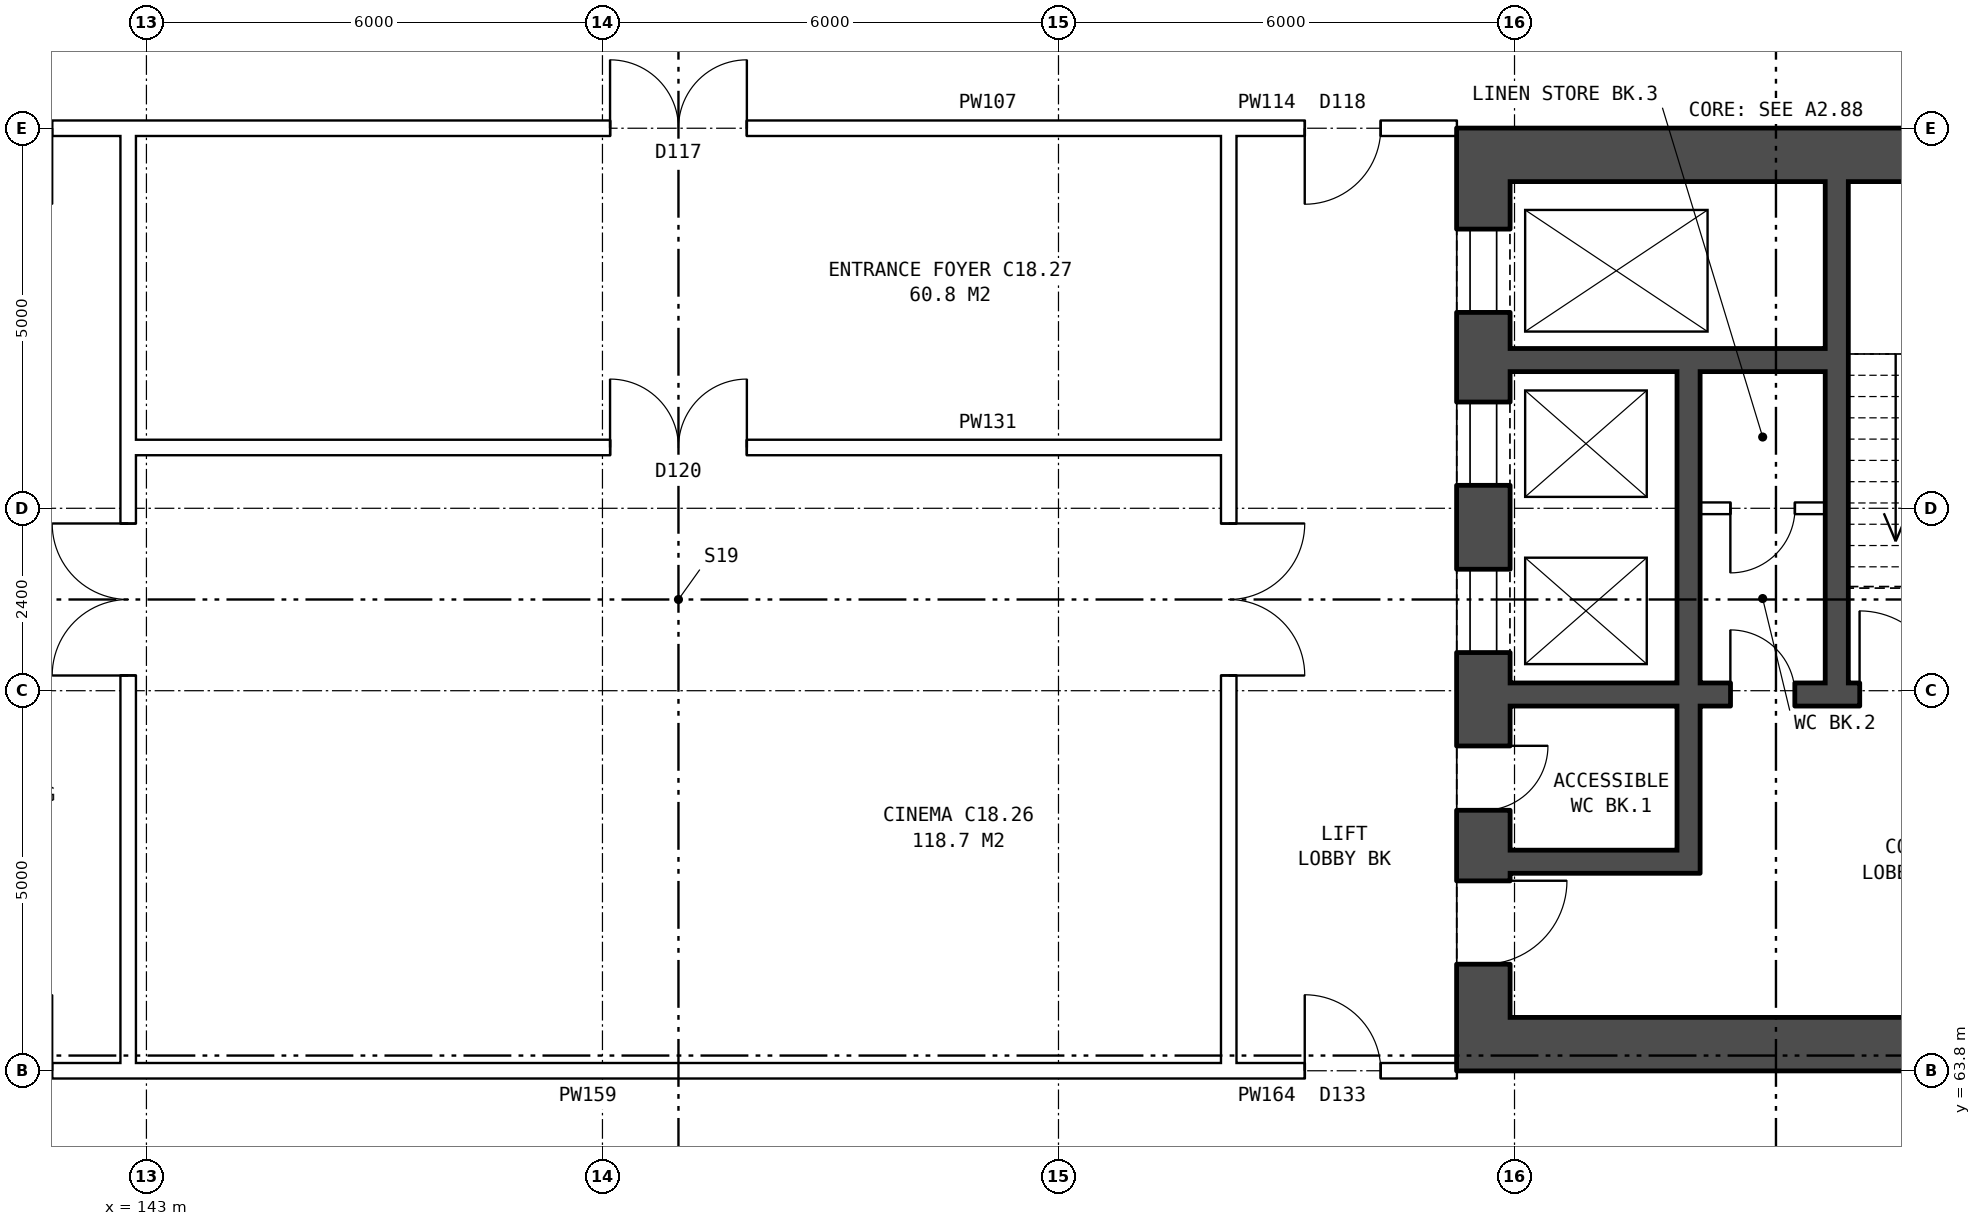
"""IFC4 building model, lengths in metres.
Left out: names, types, materials, properties, quantities, classifications, styles, units other than length and angle.
Written with IfcOpenShell. Run it as: python <this file> out.ifc"""

import sys

from ifc_helpers import new_model, si_unit, direction, frame, frame_2d, origin, place, context, subcontext, project, spatial, rectangle, extrude, element, fill, save


model = new_model("IFC4")
c1 = context("Model", 3, precision=1e-05, world=origin(), true_north=direction((0.0, 1.0)))
c2 = subcontext(c1, "Body", "Model", "MODEL_VIEW")
j1 = project(units=[si_unit("LENGTHUNIT", "METRE"), si_unit("PLANEANGLEUNIT", "RADIAN")], contexts=[c1])
p1 = place(None, origin())
s1 = spatial("IfcSite", under=j1, at=p1, CompositionType="ELEMENT")
p2 = place(p1, origin())
s2 = spatial("IfcBuilding", under=s1, at=p2, CompositionType="ELEMENT")
p3 = place(p2, frame((0.0, 0.0, 67.4)))
s3 = spatial("IfcBuildingStorey", under=s2, at=p3, CompositionType="ELEMENT", Elevation=67.4)
p4 = place(p3, frame((142.76, 63.9, 0.0), z_axis=(0.0, 0.0, 1.0), x_axis=(0.0, 1.0, 0.0)))
e1 = element("IfcWall", 1, at=p4, inside=s3, PredefinedType="PARTITIONING", context=c2, shape_type="SweptSolid", body=[
    extrude(rectangle(XDim=12.2, YDim=0.2, at=frame_2d((6.1, 0.0))), origin(), (0.0, 0.0, 1.0), 3.6),
])
p5 = place(p4, frame((5.1, 0.0, 0.0)))
e2 = element("IfcOpeningElement", 2, at=p5, cuts=e1, PredefinedType="OPENING", context=c2, shape_type="SweptSolid", body=[
    extrude(rectangle(XDim=2.0, YDim=2.1, at=frame_2d((1.0, 1.05))), frame((0.0, 0.11, 0.0), z_axis=(0.0, -1.0, 0.0), x_axis=(1.0, 0.0, 0.0)), (0.0, 0.0, 1.0), 0.22),
])
p6 = place(p3, frame((160.59, 75.5, 0.0), z_axis=(0.0, 0.0, 1.0), x_axis=(0.0, -1.0, 0.0)))
e3 = element("IfcWall", 3, at=p6, inside=s3, PredefinedType="SHEAR", context=c2, shape_type="SweptSolid", body=[
    extrude(rectangle(XDim=11.0, YDim=0.7, at=frame_2d((5.5, 0.0))), origin(), (0.0, 0.0, 1.0), 3.6),
])
p7 = place(p6, frame((0.625, 0.0, 0.0)))
e4 = element("IfcOpeningElement", 4, at=p7, cuts=e3, PredefinedType="OPENING", context=c2, shape_type="SweptSolid", body=[
    extrude(rectangle(XDim=1.1, YDim=2.1, at=frame_2d((0.55, 1.05))), frame((0.0, 0.36, 0.0), z_axis=(0.0, -1.0, 0.0), x_axis=(1.0, 0.0, 0.0)), (0.0, 0.0, 1.0), 0.72),
])
p8 = place(p6, frame((2.9, 0.0, 0.0)))
e5 = element("IfcOpeningElement", 5, at=p8, cuts=e3, PredefinedType="OPENING", context=c2, shape_type="SweptSolid", body=[
    extrude(rectangle(XDim=1.1, YDim=2.1, at=frame_2d((0.55, 1.05))), frame((0.0, 0.36, 0.0), z_axis=(0.0, -1.0, 0.0), x_axis=(1.0, 0.0, 0.0)), (0.0, 0.0, 1.0), 0.72),
])
p9 = place(p6, frame((5.1, 0.0, 0.0)))
e6 = element("IfcOpeningElement", 6, at=p9, cuts=e3, PredefinedType="OPENING", context=c2, shape_type="SweptSolid", body=[
    extrude(rectangle(XDim=1.1, YDim=2.1, at=frame_2d((0.55, 1.05))), frame((0.0, 0.36, 0.0), z_axis=(0.0, -1.0, 0.0), x_axis=(1.0, 0.0, 0.0)), (0.0, 0.0, 1.0), 0.72),
])
p10 = place(p6, frame((9.2, 0.0, 0.0)))
e7 = element("IfcOpeningElement", 7, at=p10, cuts=e3, PredefinedType="OPENING", context=c2, shape_type="SweptSolid", body=[
    extrude(rectangle(XDim=1.1, YDim=2.1, at=frame_2d((0.55, 1.05))), frame((0.0, 0.36, 0.0), z_axis=(0.0, -1.0, 0.0), x_axis=(1.0, 0.0, 0.0)), (0.0, 0.0, 1.0), 0.72),
])
p11 = place(p6, frame((7.425, 0.0, 0.0)))
e8 = element("IfcOpeningElement", 8, at=p11, cuts=e3, PredefinedType="OPENING", context=c2, shape_type="SweptSolid", body=[
    extrude(rectangle(XDim=0.85, YDim=2.1, at=frame_2d((0.425, 1.05))), frame((0.0, 0.36, 0.0), z_axis=(0.0, -1.0, 0.0), x_axis=(1.0, 0.0, 0.0)), (0.0, 0.0, 1.0), 0.72),
])
for number, where, z_axis, x_axis in (
    (9, (160.24, 75.85, 0.0), (0.0, 0.0, 1.0), (1.0, 0.0, 0.0)),
    (10, (160.24, 64.15, 0.0), (0.0, 0.0, 1.0), (1.0, 0.0, 0.0)),
):
    element("IfcWall", number, at=place(p3, frame(where, z_axis=z_axis, x_axis=x_axis)), inside=s3, PredefinedType="SHEAR", context=c2, shape_type="SweptSolid", body=[
        extrude(rectangle(XDim=8.4, YDim=0.7, at=frame_2d((4.2, 0.0))), origin(), (0.0, 0.0, 1.0), 3.6),
    ])
p12 = place(p3, frame((160.94, 73.15, 0.0), z_axis=(0.0, 0.0, 1.0), x_axis=(1.0, 0.0, 0.0)))
e11 = element("IfcWall", 11, at=p12, inside=s3, PredefinedType="SHEAR", context=c2, shape_type="SweptSolid", body=[
    extrude(rectangle(XDim=4.15, YDim=0.3, at=frame_2d((2.075, 0.0))), origin(), (0.0, 0.0, 1.0), 3.6),
])
p13 = place(p3, frame((163.44, 71.2, 0.0), z_axis=(0.0, 0.0, 1.0), x_axis=(1.0, 0.0, 0.0)))
e12 = element("IfcWall", 12, at=p13, inside=s3, PredefinedType="PARTITIONING", context=c2, shape_type="SweptSolid", body=[
    extrude(rectangle(XDim=1.65, YDim=0.15, at=frame_2d((0.825, 0.0))), origin(), (0.0, 0.0, 1.0), 3.6),
])
p14 = place(p13, frame((0.4, 0.0, 0.0)))
e13 = element("IfcOpeningElement", 13, at=p14, cuts=e12, PredefinedType="OPENING", context=c2, shape_type="SweptSolid", body=[
    extrude(rectangle(XDim=0.85, YDim=2.1, at=frame_2d((0.425, 1.05))), frame((0.0, 0.085, 0.0), z_axis=(0.0, -1.0, 0.0), x_axis=(1.0, 0.0, 0.0)), (0.0, 0.0, 1.0), 0.17),
])
p15 = place(p3, frame((160.94, 68.75, 0.0), z_axis=(0.0, 0.0, 1.0), x_axis=(1.0, 0.0, 0.0)))
e14 = element("IfcWall", 14, at=p15, inside=s3, PredefinedType="SHEAR", context=c2, shape_type="SweptSolid", body=[
    extrude(rectangle(XDim=7.0, YDim=0.3, at=frame_2d((3.5, 0.0))), origin(), (0.0, 0.0, 1.0), 3.6),
])
p16 = place(p15, frame((4.6, 0.0, 0.0)))
e15 = element("IfcOpeningElement", 15, at=p16, cuts=e14, PredefinedType="OPENING", context=c2, shape_type="SweptSolid", body=[
    extrude(rectangle(XDim=1.1, YDim=2.1, at=frame_2d((0.55, 1.05))), frame((0.0, 0.16, 0.0), z_axis=(0.0, -1.0, 0.0), x_axis=(1.0, 0.0, 0.0)), (0.0, 0.0, 1.0), 0.32),
])
p17 = place(p15, frame((2.9, 0.0, 0.0)))
e16 = element("IfcOpeningElement", 16, at=p17, cuts=e14, PredefinedType="OPENING", context=c2, shape_type="SweptSolid", body=[
    extrude(rectangle(XDim=0.85, YDim=2.1, at=frame_2d((0.425, 1.05))), frame((0.0, 0.16, 0.0), z_axis=(0.0, -1.0, 0.0), x_axis=(1.0, 0.0, 0.0)), (0.0, 0.0, 1.0), 0.32),
])
p18 = place(p3, frame((160.94, 66.55, 0.0), z_axis=(0.0, 0.0, 1.0), x_axis=(1.0, 0.0, 0.0)))
e17 = element("IfcWall", 17, at=p18, inside=s3, PredefinedType="SHEAR", context=c2, shape_type="SweptSolid", body=[
    extrude(rectangle(XDim=2.2, YDim=0.3, at=frame_2d((1.1, 0.0))), origin(), (0.0, 0.0, 1.0), 3.6),
])
p19 = place(p3, frame((163.29, 73.0, 0.0), z_axis=(0.0, 0.0, 1.0), x_axis=(0.0, -1.0, 0.0)))
e18 = element("IfcWall", 18, at=p19, inside=s3, PredefinedType="SHEAR", context=c2, shape_type="SweptSolid", body=[
    extrude(rectangle(XDim=4.1, YDim=0.3, at=frame_2d((2.05, 0.0))), origin(), (0.0, 0.0, 1.0), 3.6),
])
p20 = place(p3, frame((163.29, 68.6, 0.0), z_axis=(0.0, 0.0, 1.0), x_axis=(0.0, -1.0, 0.0)))
e19 = element("IfcWall", 19, at=p20, inside=s3, PredefinedType="SHEAR", context=c2, shape_type="SweptSolid", body=[
    extrude(rectangle(XDim=2.2, YDim=0.3, at=frame_2d((1.1, 0.0))), origin(), (0.0, 0.0, 1.0), 3.6),
])
p21 = place(p3, frame((165.24, 75.5, 0.0), z_axis=(0.0, 0.0, 1.0), x_axis=(0.0, -1.0, 0.0)))
e20 = element("IfcWall", 20, at=p21, inside=s3, PredefinedType="SHEAR", context=c2, shape_type="SweptSolid", body=[
    extrude(rectangle(XDim=6.6, YDim=0.3, at=frame_2d((3.3, 0.0))), origin(), (0.0, 0.0, 1.0), 3.6),
])
p22 = place(p3, frame((157.24, 63.9, 0.0), z_axis=(0.0, 0.0, 1.0), x_axis=(0.0, 1.0, 0.0)))
e21 = element("IfcWall", 21, at=p22, inside=s3, PredefinedType="PARTITIONING", context=c2, shape_type="SweptSolid", body=[
    extrude(rectangle(XDim=12.2, YDim=0.2, at=frame_2d((6.1, 0.0))), origin(), (0.0, 0.0, 1.0), 3.6),
])
p23 = place(p22, frame((5.1, 0.0, 0.0)))
e22 = element("IfcOpeningElement", 22, at=p23, cuts=e21, PredefinedType="OPENING", context=c2, shape_type="SweptSolid", body=[
    extrude(rectangle(XDim=2.0, YDim=2.1, at=frame_2d((1.0, 1.05))), frame((0.0, 0.11, 0.0), z_axis=(0.0, -1.0, 0.0), x_axis=(1.0, 0.0, 0.0)), (0.0, 0.0, 1.0), 0.22),
])
p24 = place(p3, frame((142.76, 63.8, 0.0), z_axis=(0.0, 0.0, 1.0), x_axis=(1.0, 0.0, 0.0)))
e23 = element("IfcWall", 23, at=p24, inside=s3, PredefinedType="PARTITIONING", context=c2, shape_type="SweptSolid", body=[
    extrude(rectangle(XDim=14.48, YDim=0.2, at=frame_2d((7.24, 0.0))), origin(), (0.0, 0.0, 1.0), 3.6),
])
p25 = place(p3, frame((139.76, 63.8, 0.0), z_axis=(0.0, 0.0, 1.0), x_axis=(1.0, 0.0, 0.0)))
e24 = element("IfcWall", 24, at=p25, inside=s3, PredefinedType="PARTITIONING", context=c2, shape_type="SweptSolid", body=[
    extrude(rectangle(XDim=3.0, YDim=0.2, at=frame_2d((1.5, 0.0))), origin(), (0.0, 0.0, 1.0), 3.6),
])
p26 = place(p25, frame((1.0, 0.0, 0.0)))
e25 = element("IfcOpeningElement", 25, at=p26, cuts=e24, PredefinedType="OPENING", context=c2, shape_type="SweptSolid", body=[
    extrude(rectangle(XDim=1.0, YDim=2.1, at=frame_2d((0.5, 1.05))), frame((0.0, 0.11, 0.0), z_axis=(0.0, -1.0, 0.0), x_axis=(1.0, 0.0, 0.0)), (0.0, 0.0, 1.0), 0.22),
])
p27 = place(p3, frame((157.24, 63.8, 0.0), z_axis=(0.0, 0.0, 1.0), x_axis=(1.0, 0.0, 0.0)))
e26 = element("IfcWall", 26, at=p27, inside=s3, PredefinedType="PARTITIONING", context=c2, shape_type="SweptSolid", body=[
    extrude(rectangle(XDim=3.0, YDim=0.2, at=frame_2d((1.5, 0.0))), origin(), (0.0, 0.0, 1.0), 3.6),
])
p28 = place(p27, frame((1.0, 0.0, 0.0)))
e27 = element("IfcOpeningElement", 27, at=p28, cuts=e26, PredefinedType="OPENING", context=c2, shape_type="SweptSolid", body=[
    extrude(rectangle(XDim=1.0, YDim=2.1, at=frame_2d((0.5, 1.05))), frame((0.0, 0.11, 0.0), z_axis=(0.0, -1.0, 0.0), x_axis=(1.0, 0.0, 0.0)), (0.0, 0.0, 1.0), 0.22),
])
p29 = place(p3, frame((142.76, 72.0, 0.0), z_axis=(0.0, 0.0, 1.0), x_axis=(1.0, 0.0, 0.0)))
e28 = element("IfcWall", 28, at=p29, inside=s3, PredefinedType="PARTITIONING", context=c2, shape_type="SweptSolid", body=[
    extrude(rectangle(XDim=14.48, YDim=0.2, at=frame_2d((7.24, 0.0))), origin(), (0.0, 0.0, 1.0), 3.6),
])
p30 = place(p29, frame((6.34, 0.0, 0.0)))
e29 = element("IfcOpeningElement", 29, at=p30, cuts=e28, PredefinedType="OPENING", context=c2, shape_type="SweptSolid", body=[
    extrude(rectangle(XDim=1.8, YDim=2.1, at=frame_2d((0.9, 1.05))), frame((0.0, 0.11, 0.0), z_axis=(0.0, -1.0, 0.0), x_axis=(1.0, 0.0, 0.0)), (0.0, 0.0, 1.0), 0.22),
])
p31 = place(p3, frame((142.76, 76.2, 0.0), z_axis=(0.0, 0.0, 1.0), x_axis=(1.0, 0.0, 0.0)))
e30 = element("IfcWall", 30, at=p31, inside=s3, PredefinedType="PARTITIONING", context=c2, shape_type="SweptSolid", body=[
    extrude(rectangle(XDim=14.48, YDim=0.2, at=frame_2d((7.24, 0.0))), origin(), (0.0, 0.0, 1.0), 3.6),
])
p32 = place(p31, frame((6.34, 0.0, 0.0)))
e31 = element("IfcOpeningElement", 31, at=p32, cuts=e30, PredefinedType="OPENING", context=c2, shape_type="SweptSolid", body=[
    extrude(rectangle(XDim=1.8, YDim=2.1, at=frame_2d((0.9, 1.05))), frame((0.0, 0.11, 0.0), z_axis=(0.0, -1.0, 0.0), x_axis=(1.0, 0.0, 0.0)), (0.0, 0.0, 1.0), 0.22),
])
p33 = place(p3, frame((139.76, 76.2, 0.0), z_axis=(0.0, 0.0, 1.0), x_axis=(1.0, 0.0, 0.0)))
e32 = element("IfcWall", 32, at=p33, inside=s3, PredefinedType="PARTITIONING", context=c2, shape_type="SweptSolid", body=[
    extrude(rectangle(XDim=3.0, YDim=0.2, at=frame_2d((1.5, 0.0))), origin(), (0.0, 0.0, 1.0), 3.6),
])
p34 = place(p33, frame((1.0, 0.0, 0.0)))
e33 = element("IfcOpeningElement", 33, at=p34, cuts=e32, PredefinedType="OPENING", context=c2, shape_type="SweptSolid", body=[
    extrude(rectangle(XDim=1.0, YDim=2.1, at=frame_2d((0.5, 1.05))), frame((0.0, 0.11, 0.0), z_axis=(0.0, -1.0, 0.0), x_axis=(1.0, 0.0, 0.0)), (0.0, 0.0, 1.0), 0.22),
])
p35 = place(p3, frame((157.24, 76.2, 0.0), z_axis=(0.0, 0.0, 1.0), x_axis=(1.0, 0.0, 0.0)))
e34 = element("IfcWall", 34, at=p35, inside=s3, PredefinedType="PARTITIONING", context=c2, shape_type="SweptSolid", body=[
    extrude(rectangle(XDim=3.0, YDim=0.2, at=frame_2d((1.5, 0.0))), origin(), (0.0, 0.0, 1.0), 3.6),
])
p36 = place(p35, frame((1.0, 0.0, 0.0)))
e35 = element("IfcOpeningElement", 35, at=p36, cuts=e34, PredefinedType="OPENING", context=c2, shape_type="SweptSolid", body=[
    extrude(rectangle(XDim=1.0, YDim=2.1, at=frame_2d((0.5, 1.05))), frame((0.0, 0.11, 0.0), z_axis=(0.0, -1.0, 0.0), x_axis=(1.0, 0.0, 0.0)), (0.0, 0.0, 1.0), 0.22),
])
p37 = place(p5, origin())
e36 = element("IfcDoor", 36, at=p37, inside=s3, OperationType="DOUBLE_DOOR_SINGLE_SWING", PredefinedType="DOOR", context=c2, shape_type="SweptSolid", body=[
    extrude(rectangle(XDim=2.0, YDim=2.1, at=frame_2d((1.0, 1.05))), frame((0.0, 0.025, 0.0), z_axis=(0.0, -1.0, 0.0), x_axis=(1.0, 0.0, 0.0)), (0.0, 0.0, 1.0), 0.05),
])
fill(e2, e36)
p38 = place(p7, origin())
e37 = element("IfcDoor", 37, at=p38, inside=s3, OperationType="DOUBLE_DOOR_SLIDING", PredefinedType="DOOR", context=c2, shape_type="SweptSolid", body=[
    extrude(rectangle(XDim=1.1, YDim=2.1, at=frame_2d((0.55, 1.05))), frame((0.0, 0.335, 0.0), z_axis=(0.0, -1.0, 0.0), x_axis=(1.0, 0.0, 0.0)), (0.0, 0.0, 1.0), 0.05),
])
fill(e4, e37)
p39 = place(p8, origin())
e38 = element("IfcDoor", 38, at=p39, inside=s3, OperationType="DOUBLE_DOOR_SLIDING", PredefinedType="DOOR", context=c2, shape_type="SweptSolid", body=[
    extrude(rectangle(XDim=1.1, YDim=2.1, at=frame_2d((0.55, 1.05))), frame((0.0, 0.335, 0.0), z_axis=(0.0, -1.0, 0.0), x_axis=(1.0, 0.0, 0.0)), (0.0, 0.0, 1.0), 0.05),
])
fill(e5, e38)
p40 = place(p9, origin())
e39 = element("IfcDoor", 39, at=p40, inside=s3, OperationType="DOUBLE_DOOR_SLIDING", PredefinedType="DOOR", context=c2, shape_type="SweptSolid", body=[
    extrude(rectangle(XDim=1.1, YDim=2.1, at=frame_2d((0.55, 1.05))), frame((0.0, 0.335, 0.0), z_axis=(0.0, -1.0, 0.0), x_axis=(1.0, 0.0, 0.0)), (0.0, 0.0, 1.0), 0.05),
])
fill(e6, e39)
p41 = place(p10, origin())
e40 = element("IfcDoor", 40, at=p41, inside=s3, OperationType="SINGLE_SWING_LEFT", PredefinedType="DOOR", context=c2, shape_type="SweptSolid", body=[
    extrude(rectangle(XDim=1.1, YDim=2.1, at=frame_2d((0.55, 1.05))), frame((0.0, 0.335, 0.0), z_axis=(0.0, -1.0, 0.0), x_axis=(1.0, 0.0, 0.0)), (0.0, 0.0, 1.0), 0.05),
])
fill(e7, e40)
p42 = place(p16, origin())
e41 = element("IfcDoor", 41, at=p42, inside=s3, OperationType="SINGLE_SWING_LEFT", PredefinedType="DOOR", context=c2, shape_type="SweptSolid", body=[
    extrude(rectangle(XDim=1.1, YDim=2.1, at=frame_2d((0.55, 1.05))), frame((0.0, 0.025, 0.0), z_axis=(0.0, -1.0, 0.0), x_axis=(1.0, 0.0, 0.0)), (0.0, 0.0, 1.0), 0.05),
])
fill(e15, e41)
p43 = place(p11, origin())
e42 = element("IfcDoor", 42, at=p43, inside=s3, OperationType="SINGLE_SWING_LEFT", PredefinedType="DOOR", context=c2, shape_type="SweptSolid", body=[
    extrude(rectangle(XDim=0.85, YDim=2.1, at=frame_2d((0.425, 1.05))), frame((0.0, 0.335, 0.0), z_axis=(0.0, -1.0, 0.0), x_axis=(1.0, 0.0, 0.0)), (0.0, 0.0, 1.0), 0.05),
])
fill(e8, e42)
p44 = place(p17, origin())
e43 = element("IfcDoor", 43, at=p44, inside=s3, OperationType="SINGLE_SWING_LEFT", PredefinedType="DOOR", context=c2, shape_type="SweptSolid", body=[
    extrude(rectangle(XDim=0.85, YDim=2.1, at=frame_2d((0.425, 1.05))), frame((0.0, 0.025, 0.0), z_axis=(0.0, -1.0, 0.0), x_axis=(1.0, 0.0, 0.0)), (0.0, 0.0, 1.0), 0.05),
])
fill(e16, e43)
p45 = place(p14, frame((0.85, 0.0, 0.0), z_axis=(0.0, 0.0, 1.0), x_axis=(-1.0, 0.0, 0.0)))
e44 = element("IfcDoor", 44, at=p45, inside=s3, OperationType="SINGLE_SWING_RIGHT", PredefinedType="DOOR", context=c2, shape_type="SweptSolid", body=[
    extrude(rectangle(XDim=0.85, YDim=2.1, at=frame_2d((0.425, 1.05))), frame((0.0, 0.025, 0.0), z_axis=(0.0, -1.0, 0.0), x_axis=(1.0, 0.0, 0.0)), (0.0, 0.0, 1.0), 0.05),
])
fill(e13, e44)
p46 = place(p23, frame((2.0, 0.0, 0.0), z_axis=(0.0, 0.0, 1.0), x_axis=(-1.0, 0.0, 0.0)))
e45 = element("IfcDoor", 45, at=p46, inside=s3, OperationType="DOUBLE_DOOR_SINGLE_SWING", PredefinedType="DOOR", context=c2, shape_type="SweptSolid", body=[
    extrude(rectangle(XDim=2.0, YDim=2.1, at=frame_2d((1.0, 1.05))), frame((0.0, 0.025, 0.0), z_axis=(0.0, -1.0, 0.0), x_axis=(1.0, 0.0, 0.0)), (0.0, 0.0, 1.0), 0.05),
])
fill(e22, e45)
p47 = place(p28, origin())
e46 = element("IfcDoor", 46, at=p47, inside=s3, OperationType="SINGLE_SWING_LEFT", PredefinedType="DOOR", context=c2, shape_type="SweptSolid", body=[
    extrude(rectangle(XDim=1.0, YDim=2.1, at=frame_2d((0.5, 1.05))), frame((0.0, 0.025, 0.0), z_axis=(0.0, -1.0, 0.0), x_axis=(1.0, 0.0, 0.0)), (0.0, 0.0, 1.0), 0.05),
])
fill(e27, e46)
p48 = place(p30, origin())
e47 = element("IfcDoor", 47, at=p48, inside=s3, OperationType="DOUBLE_DOOR_SINGLE_SWING", PredefinedType="DOOR", context=c2, shape_type="SweptSolid", body=[
    extrude(rectangle(XDim=1.8, YDim=2.1, at=frame_2d((0.9, 1.05))), frame((0.0, 0.025, 0.0), z_axis=(0.0, -1.0, 0.0), x_axis=(1.0, 0.0, 0.0)), (0.0, 0.0, 1.0), 0.05),
])
fill(e29, e47)
p49 = place(p32, origin())
e48 = element("IfcDoor", 48, at=p49, inside=s3, OperationType="DOUBLE_DOOR_SINGLE_SWING", PredefinedType="DOOR", context=c2, shape_type="SweptSolid", body=[
    extrude(rectangle(XDim=1.8, YDim=2.1, at=frame_2d((0.9, 1.05))), frame((0.0, 0.025, 0.0), z_axis=(0.0, -1.0, 0.0), x_axis=(1.0, 0.0, 0.0)), (0.0, 0.0, 1.0), 0.05),
])
fill(e31, e48)
p50 = place(p36, frame((1.0, 0.0, 0.0), z_axis=(0.0, 0.0, 1.0), x_axis=(-1.0, 0.0, 0.0)))
e49 = element("IfcDoor", 49, at=p50, inside=s3, OperationType="SINGLE_SWING_RIGHT", PredefinedType="DOOR", context=c2, shape_type="SweptSolid", body=[
    extrude(rectangle(XDim=1.0, YDim=2.1, at=frame_2d((0.5, 1.05))), frame((0.0, 0.025, 0.0), z_axis=(0.0, -1.0, 0.0), x_axis=(1.0, 0.0, 0.0)), (0.0, 0.0, 1.0), 0.05),
])
fill(e35, e49)
save(model, sys.argv[1])
